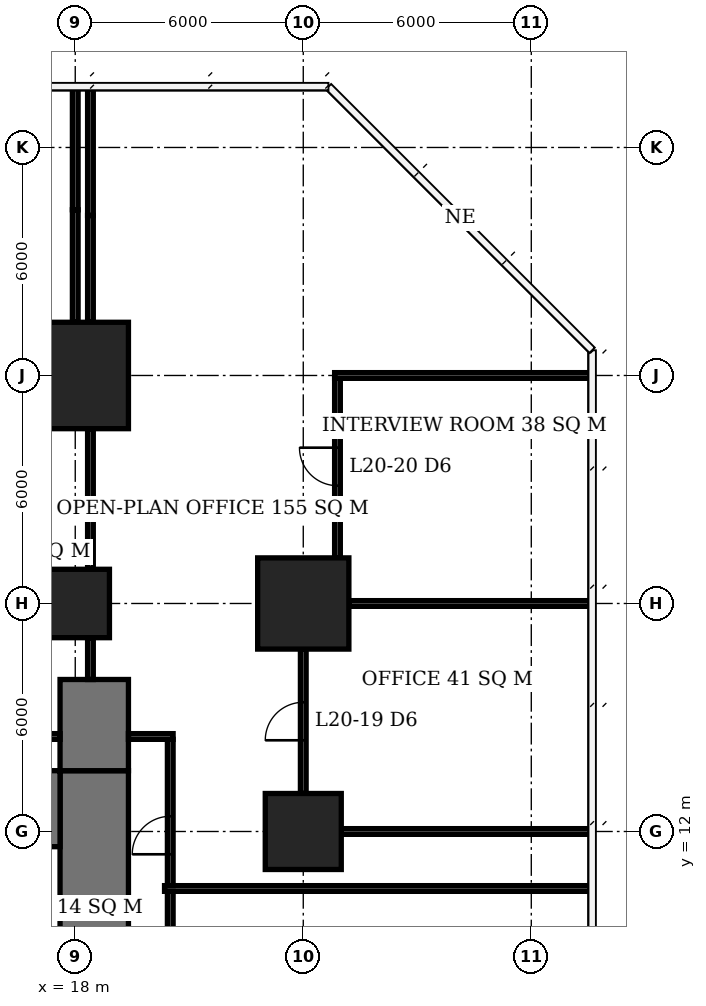
"""IFC4 building model, lengths in metres.
Left out: names, types, materials, properties, quantities, classifications, styles, units other than length and angle.
Written with IfcOpenShell. Run it as: python <this file> out.ifc"""

import sys

from ifc_helpers import new_model, si_unit, direction, frame, frame_2d, origin, origin_2d, place, context, subcontext, project, spatial, rectangle, extrude, element, fill, save


model = new_model("IFC4")
c1 = context("Model", 3, precision=1e-05, world=origin(), true_north=direction((0.0, 1.0)))
c2 = subcontext(c1, "Body", "Model", "MODEL_VIEW")
j1 = project(units=[si_unit("LENGTHUNIT", "METRE"), si_unit("PLANEANGLEUNIT", "RADIAN")], contexts=[c1])
p1 = place(None, origin())
s1 = spatial("IfcSite", under=j1, at=p1, CompositionType="ELEMENT")
p2 = place(p1, origin())
s2 = spatial("IfcBuilding", under=s1, at=p2, CompositionType="ELEMENT")
p3 = place(p2, frame((0.0, 0.0, 84.5)))
s3 = spatial("IfcBuildingStorey", under=s2, at=p3, CompositionType="ELEMENT", Elevation=84.5)
p4 = place(p3, frame((18.0, 18.0, 0.0), z_axis=(0.0, 0.0, 1.0), x_axis=(1.0, 0.0, 0.0)))
e1 = element("IfcColumn", 1, at=p4, inside=s3, PredefinedType="COLUMN", context=c2, shape_type="SweptSolid", body=[
    extrude(rectangle(XDim=1.8, YDim=1.8, at=origin_2d()), origin(), (0.0, 0.0, 1.0), 3.9),
])
p5 = place(p3, frame((18.0, 24.0, 0.0), z_axis=(0.0, 0.0, 1.0), x_axis=(1.0, 0.0, 0.0)))
e2 = element("IfcColumn", 2, at=p5, inside=s3, PredefinedType="COLUMN", context=c2, shape_type="SweptSolid", body=[
    extrude(rectangle(XDim=2.8, YDim=2.8, at=origin_2d()), origin(), (0.0, 0.0, 1.0), 3.9),
])
p6 = place(p3, frame((24.0, 12.0, 0.0), z_axis=(0.0, 0.0, 1.0), x_axis=(1.0, 0.0, 0.0)))
e3 = element("IfcColumn", 3, at=p6, inside=s3, PredefinedType="COLUMN", context=c2, shape_type="SweptSolid", body=[
    extrude(rectangle(XDim=2.0, YDim=2.0, at=origin_2d()), origin(), (0.0, 0.0, 1.0), 3.9),
])
p7 = place(p3, frame((24.0, 18.0, 0.0), z_axis=(0.0, 0.0, 1.0), x_axis=(1.0, 0.0, 0.0)))
e4 = element("IfcColumn", 4, at=p7, inside=s3, PredefinedType="COLUMN", context=c2, shape_type="SweptSolid", body=[
    extrude(rectangle(XDim=2.4, YDim=2.4, at=origin_2d()), origin(), (0.0, 0.0, 1.0), 3.9),
])
p8 = place(p3, frame((-5.6, 12.6, 0.0), z_axis=(0.0, 0.0, 1.0), x_axis=(1.0, 0.0, 0.0)))
e5 = element("IfcWall", 5, at=p8, inside=s3, PredefinedType="SHEAR", context=c2, shape_type="SweptSolid", body=[
    extrude(rectangle(XDim=23.2, YDim=2.0, at=frame_2d((11.6, 0.0))), origin(), (0.0, 0.0, 1.0), 3.9),
])
p9 = place(p3, frame((18.5, -7.6, 0.0), z_axis=(0.0, 0.0, 1.0), x_axis=(0.0, 1.0, 0.0)))
e6 = element("IfcWall", 6, at=p9, inside=s3, PredefinedType="SHEAR", context=c2, shape_type="SweptSolid", body=[
    extrude(rectangle(XDim=21.2, YDim=1.8, at=frame_2d((10.6, 0.0))), origin(), (0.0, 0.0, 1.0), 3.9),
])
p10 = place(p9, frame((9.2, 0.0, 0.0)))
e7 = element("IfcOpeningElement", 7, at=p10, cuts=e6, PredefinedType="OPENING", context=c2, shape_type="SweptSolid", body=[
    extrude(rectangle(XDim=1.8, YDim=2.4, at=frame_2d((0.9, 1.2))), frame((0.0, 0.91, 0.0), z_axis=(0.0, -1.0, 0.0), x_axis=(1.0, 0.0, 0.0)), (0.0, 0.0, 1.0), 1.82),
])
p11 = place(p3, frame((18.5, 13.6, 0.0), z_axis=(0.0, 0.0, 1.0), x_axis=(0.0, 1.0, 0.0)))
e8 = element("IfcWall", 8, at=p11, inside=s3, PredefinedType="SHEAR", context=c2, shape_type="SweptSolid", body=[
    extrude(rectangle(XDim=2.4, YDim=1.8, at=frame_2d((1.2, 0.0))), origin(), (0.0, 0.0, 1.0), 3.9),
])
p12 = place(p3, frame((25.0, 12.0, 0.0), z_axis=(0.0, 0.0, 1.0), x_axis=(1.0, 0.0, 0.0)))
e9 = element("IfcWall", 9, at=p12, inside=s3, PredefinedType="PARTITIONING", context=c2, shape_type="SweptSolid", body=[
    extrude(rectangle(XDim=6.6, YDim=0.15, at=frame_2d((3.3, 0.0))), origin(), (0.0, 0.0, 1.0), 3.65),
])
p13 = place(p3, frame((25.2, 18.0, 0.0), z_axis=(0.0, 0.0, 1.0), x_axis=(1.0, 0.0, 0.0)))
e10 = element("IfcWall", 10, at=p13, inside=s3, PredefinedType="PARTITIONING", context=c2, shape_type="SweptSolid", body=[
    extrude(rectangle(XDim=6.4, YDim=0.15, at=frame_2d((3.2, 0.0))), origin(), (0.0, 0.0, 1.0), 3.65),
])
p14 = place(p3, frame((24.825, 24.0, 0.0), z_axis=(0.0, 0.0, 1.0), x_axis=(1.0, 0.0, 0.0)))
e11 = element("IfcWall", 11, at=p14, inside=s3, PredefinedType="PARTITIONING", context=c2, shape_type="SweptSolid", body=[
    extrude(rectangle(XDim=6.775, YDim=0.15, at=frame_2d((3.388, 0.0))), origin(), (0.0, 0.0, 1.0), 3.65),
])
p15 = place(p3, frame((18.0, 25.4, 0.0), z_axis=(0.0, 0.0, 1.0), x_axis=(0.0, 1.0, 0.0)))
e12 = element("IfcWall", 12, at=p15, inside=s3, PredefinedType="PARTITIONING", context=c2, shape_type="SweptSolid", body=[
    extrude(rectangle(XDim=2.96, YDim=0.15, at=frame_2d((1.48, 0.0))), origin(), (0.0, 0.0, 1.0), 2.15),
])
p16 = place(p3, frame((18.0, 28.36, 0.0), z_axis=(0.0, 0.0, 1.0), x_axis=(0.0, 1.0, 0.0)))
e13 = element("IfcWall", 13, at=p16, inside=s3, PredefinedType="PARTITIONING", context=c2, shape_type="SweptSolid", body=[
    extrude(rectangle(XDim=3.24, YDim=0.15, at=frame_2d((1.62, 0.0))), origin(), (0.0, 0.0, 1.0), 3.65),
])
p17 = place(p3, frame((24.0, 13.0, 0.0), z_axis=(0.0, 0.0, 1.0), x_axis=(0.0, 1.0, 0.0)))
e14 = element("IfcWall", 14, at=p17, inside=s3, PredefinedType="PARTITIONING", context=c2, shape_type="SweptSolid", body=[
    extrude(rectangle(XDim=3.8, YDim=0.15, at=frame_2d((1.9, 0.0))), origin(), (0.0, 0.0, 1.0), 3.65),
])
p18 = place(p17, frame((1.4, 0.0, 0.0)))
e15 = element("IfcOpeningElement", 15, at=p18, cuts=e14, PredefinedType="OPENING", context=c2, shape_type="SweptSolid", body=[
    extrude(rectangle(XDim=1.0, YDim=2.1, at=frame_2d((0.5, 1.05))), frame((0.0, 0.085, 0.0), z_axis=(0.0, -1.0, 0.0), x_axis=(1.0, 0.0, 0.0)), (0.0, 0.0, 1.0), 0.17),
])
p19 = place(p3, frame((24.9, 19.2, 0.0), z_axis=(0.0, 0.0, 1.0), x_axis=(0.0, 1.0, 0.0)))
e16 = element("IfcWall", 16, at=p19, inside=s3, PredefinedType="PARTITIONING", context=c2, shape_type="SweptSolid", body=[
    extrude(rectangle(XDim=4.725, YDim=0.15, at=frame_2d((2.363, 0.0))), origin(), (0.0, 0.0, 1.0), 3.65),
])
p20 = place(p19, frame((1.9, 0.0, 0.0)))
e17 = element("IfcOpeningElement", 17, at=p20, cuts=e16, PredefinedType="OPENING", context=c2, shape_type="SweptSolid", body=[
    extrude(rectangle(XDim=1.0, YDim=2.1, at=frame_2d((0.5, 1.05))), frame((0.0, 0.085, 0.0), z_axis=(0.0, -1.0, 0.0), x_axis=(1.0, 0.0, 0.0)), (0.0, 0.0, 1.0), 0.17),
])
p21 = place(p3, frame((10.575, 14.5, 0.0), z_axis=(0.0, 0.0, 1.0), x_axis=(1.0, 0.0, 0.0)))
e18 = element("IfcWall", 18, at=p21, inside=s3, PredefinedType="PARTITIONING", context=c2, shape_type="SweptSolid", body=[
    extrude(rectangle(XDim=7.025, YDim=0.15, at=frame_2d((3.513, 0.0))), origin(), (0.0, 0.0, 1.0), 3.65),
])
p22 = place(p21, frame((4.04, 0.0, 0.0)))
e19 = element("IfcOpeningElement", 19, at=p22, cuts=e18, PredefinedType="OPENING", context=c2, shape_type="SweptSolid", body=[
    extrude(rectangle(XDim=1.0, YDim=2.1, at=frame_2d((0.5, 1.05))), frame((0.0, 0.085, 0.0), z_axis=(0.0, -1.0, 0.0), x_axis=(1.0, 0.0, 0.0)), (0.0, 0.0, 1.0), 0.17),
])
p23 = place(p3, frame((18.4, 16.0, 0.0), z_axis=(0.0, 0.0, 1.0), x_axis=(0.0, 1.0, 0.0)))
e20 = element("IfcWall", 20, at=p23, inside=s3, PredefinedType="PARTITIONING", context=c2, shape_type="SweptSolid", body=[
    extrude(rectangle(XDim=1.1, YDim=0.15, at=frame_2d((0.55, 0.0))), origin(), (0.0, 0.0, 1.0), 3.65),
])
p24 = place(p3, frame((18.4, 18.9, 0.0), z_axis=(0.0, 0.0, 1.0), x_axis=(0.0, 1.0, 0.0)))
e21 = element("IfcWall", 21, at=p24, inside=s3, PredefinedType="PARTITIONING", context=c2, shape_type="SweptSolid", body=[
    extrude(rectangle(XDim=3.7, YDim=0.15, at=frame_2d((1.85, 0.0))), origin(), (0.0, 0.0, 1.0), 3.65),
])
p25 = place(p3, frame((18.4, 25.4, 0.0), z_axis=(0.0, 0.0, 1.0), x_axis=(0.0, 1.0, 0.0)))
e22 = element("IfcWall", 22, at=p25, inside=s3, PredefinedType="PARTITIONING", context=c2, shape_type="SweptSolid", body=[
    extrude(rectangle(XDim=2.811, YDim=0.15, at=frame_2d((1.405, 0.0))), origin(), (0.0, 0.0, 1.0), 2.15),
])
p26 = place(p3, frame((18.4, 28.211, 0.0), z_axis=(0.0, 0.0, 1.0), x_axis=(0.0, 1.0, 0.0)))
e23 = element("IfcWall", 23, at=p26, inside=s3, PredefinedType="PARTITIONING", context=c2, shape_type="SweptSolid", body=[
    extrude(rectangle(XDim=3.339, YDim=0.15, at=frame_2d((1.67, 0.0))), origin(), (0.0, 0.0, 1.0), 3.65),
])
p27 = place(p3, frame((19.4, 14.5, 0.0), z_axis=(0.0, 0.0, 1.0), x_axis=(1.0, 0.0, 0.0)))
e24 = element("IfcWall", 24, at=p27, inside=s3, PredefinedType="PARTITIONING", context=c2, shape_type="SweptSolid", body=[
    extrude(rectangle(XDim=1.175, YDim=0.15, at=frame_2d((0.587, 0.0))), origin(), (0.0, 0.0, 1.0), 3.65),
])
p28 = place(p3, frame((20.5, -4.425, 0.0), z_axis=(0.0, 0.0, 1.0), x_axis=(0.0, 1.0, 0.0)))
e25 = element("IfcWall", 25, at=p28, inside=s3, PredefinedType="PARTITIONING", context=c2, shape_type="SweptSolid", body=[
    extrude(rectangle(XDim=14.85, YDim=0.15, at=frame_2d((7.425, 0.0))), origin(), (0.0, 0.0, 1.0), 3.65),
])
p29 = place(p28, frame((9.175, 0.0, 0.0)))
e26 = element("IfcOpeningElement", 26, at=p29, cuts=e25, PredefinedType="OPENING", context=c2, shape_type="SweptSolid", body=[
    extrude(rectangle(XDim=1.0, YDim=2.1, at=frame_2d((0.5, 1.05))), frame((0.0, 0.085, 0.0), z_axis=(0.0, -1.0, 0.0), x_axis=(1.0, 0.0, 0.0)), (0.0, 0.0, 1.0), 0.17),
])
p30 = place(p3, frame((20.5, 10.575, 0.0), z_axis=(0.0, 0.0, 1.0), x_axis=(0.0, 1.0, 0.0)))
e27 = element("IfcWall", 27, at=p30, inside=s3, PredefinedType="PARTITIONING", context=c2, shape_type="SweptSolid", body=[
    extrude(rectangle(XDim=3.85, YDim=0.15, at=frame_2d((1.925, 0.0))), origin(), (0.0, 0.0, 1.0), 3.65),
])
p31 = place(p30, frame((0.825, 0.0, 0.0)))
e28 = element("IfcOpeningElement", 28, at=p31, cuts=e27, PredefinedType="OPENING", context=c2, shape_type="SweptSolid", body=[
    extrude(rectangle(XDim=1.0, YDim=2.1, at=frame_2d((0.5, 1.05))), frame((0.0, 0.085, 0.0), z_axis=(0.0, -1.0, 0.0), x_axis=(1.0, 0.0, 0.0)), (0.0, 0.0, 1.0), 0.17),
])
p32 = place(p3, frame((20.35, 10.5, 0.0), z_axis=(0.0, 0.0, 1.0), x_axis=(1.0, 0.0, 0.0)))
e29 = element("IfcWall", 29, at=p32, inside=s3, PredefinedType="PARTITIONING", context=c2, shape_type="SweptSolid", body=[
    extrude(rectangle(XDim=11.25, YDim=0.15, at=frame_2d((5.625, 0.0))), origin(), (0.0, 0.0, 1.0), 3.65),
])
p33 = place(p18, origin())
e30 = element("IfcDoor", 30, at=p33, inside=s3, OperationType="SINGLE_SWING_LEFT", PredefinedType="DOOR", context=c2, shape_type="SweptSolid", body=[
    extrude(rectangle(XDim=1.0, YDim=2.1, at=frame_2d((0.5, 1.05))), frame((0.0, 0.025, 0.0), z_axis=(0.0, -1.0, 0.0), x_axis=(1.0, 0.0, 0.0)), (0.0, 0.0, 1.0), 0.05),
])
fill(e15, e30)
p34 = place(p20, origin())
e31 = element("IfcDoor", 31, at=p34, inside=s3, OperationType="SINGLE_SWING_RIGHT", PredefinedType="DOOR", context=c2, shape_type="SweptSolid", body=[
    extrude(rectangle(XDim=1.0, YDim=2.1, at=frame_2d((0.5, 1.05))), frame((0.0, 0.025, 0.0), z_axis=(0.0, -1.0, 0.0), x_axis=(1.0, 0.0, 0.0)), (0.0, 0.0, 1.0), 0.05),
])
fill(e17, e31)
p35 = place(p31, origin())
e32 = element("IfcDoor", 32, at=p35, inside=s3, OperationType="SINGLE_SWING_LEFT", PredefinedType="DOOR", context=c2, shape_type="SweptSolid", body=[
    extrude(rectangle(XDim=1.0, YDim=2.1, at=frame_2d((0.5, 1.05))), frame((0.0, 0.025, 0.0), z_axis=(0.0, -1.0, 0.0), x_axis=(1.0, 0.0, 0.0)), (0.0, 0.0, 1.0), 0.05),
])
fill(e28, e32)
save(model, sys.argv[1])
